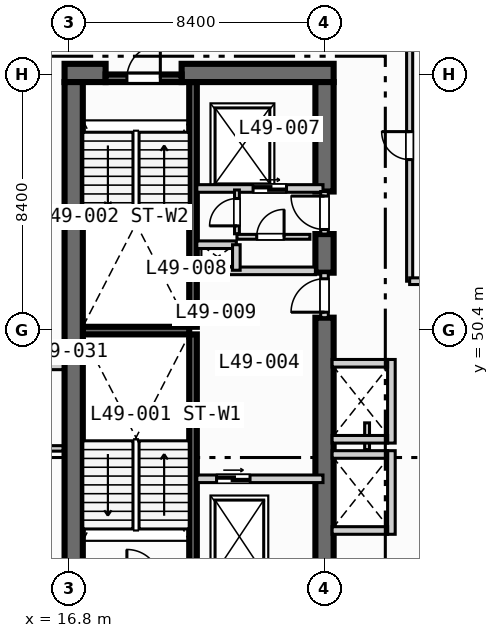
"""IFC4 building model, lengths in metres.
Left out: names, types, materials, properties, quantities, classifications, styles, units other than length and angle.
Written with IfcOpenShell. Run it as: python <this file> out.ifc"""

import sys

from ifc_helpers import new_model, si_unit, direction, frame, frame_2d, origin, place, context, subcontext, project, spatial, rectangle, extrude, element, fill, save


model = new_model("IFC4")
c1 = context("Model", 3, precision=1e-05, world=origin(), true_north=direction((0.0, 1.0)))
c2 = subcontext(c1, "Body", "Model", "MODEL_VIEW")
j1 = project(units=[si_unit("LENGTHUNIT", "METRE"), si_unit("PLANEANGLEUNIT", "RADIAN")], contexts=[c1])
p1 = place(None, origin())
s1 = spatial("IfcSite", under=j1, at=p1, CompositionType="ELEMENT")
p2 = place(p1, origin())
s2 = spatial("IfcBuilding", under=s1, at=p2, CompositionType="ELEMENT")
p3 = place(p2, frame((0.0, 0.0, 201.3)))
s3 = spatial("IfcBuildingStorey", under=s2, at=p3, CompositionType="ELEMENT", Elevation=201.3)
for number, where, z_axis, x_axis in (
    (1, (20.875, 42.2, 0.0), (0.0, 0.0, 1.0), (0.0, 1.0, 0.0)),
    (2, (20.875, 50.5, 0.0), (0.0, 0.0, 1.0), (0.0, 1.0, 0.0)),
):
    element("IfcWall", number, at=place(p3, frame(where, z_axis=z_axis, x_axis=x_axis)), inside=s3, PredefinedType="SOLIDWALL", context=c2, shape_type="SweptSolid", body=[
        extrude(rectangle(XDim=8.05, YDim=0.25, at=frame_2d((4.025, 0.0))), origin(), (0.0, 0.0, 1.0), 3.47),
    ])
p4 = place(p3, frame((17.25, 50.375, 0.0), z_axis=(0.0, 0.0, 1.0), x_axis=(1.0, 0.0, 0.0)))
e3 = element("IfcWall", 3, at=p4, inside=s3, PredefinedType="SOLIDWALL", context=c2, shape_type="SweptSolid", body=[
    extrude(rectangle(XDim=3.5, YDim=0.25, at=frame_2d((1.75, 0.0))), origin(), (0.0, 0.0, 1.0), 3.47),
])
p5 = place(p3, frame((16.65, 58.85, 0.0), z_axis=(0.0, 0.0, 1.0), x_axis=(1.0, 0.0, 0.0)))
e4 = element("IfcWall", 4, at=p5, inside=s3, PredefinedType="SHEAR", context=c2, shape_type="SweptSolid", body=[
    extrude(rectangle(XDim=1.35, YDim=0.6, at=frame_2d((0.675, 0.0))), origin(), (0.0, 0.0, 1.0), 3.47),
])
p6 = place(p3, frame((20.5, 58.85, 0.0), z_axis=(0.0, 0.0, 1.0), x_axis=(1.0, 0.0, 0.0)))
e5 = element("IfcWall", 5, at=p6, inside=s3, PredefinedType="SHEAR", context=c2, shape_type="SweptSolid", body=[
    extrude(rectangle(XDim=5.0, YDim=0.6, at=frame_2d((2.5, 0.0))), origin(), (0.0, 0.0, 1.0), 3.47),
])
p7 = place(p3, frame((16.95, 42.2, 0.0), z_axis=(0.0, 0.0, 1.0), x_axis=(0.0, 1.0, 0.0)))
e6 = element("IfcWall", 6, at=p7, inside=s3, PredefinedType="SHEAR", context=c2, shape_type="SweptSolid", body=[
    extrude(rectangle(XDim=16.35, YDim=0.6, at=frame_2d((8.175, 0.0))), origin(), (0.0, 0.0, 1.0), 3.47),
])
p8 = place(p3, frame((25.2, 42.2, 0.0), z_axis=(0.0, 0.0, 1.0), x_axis=(0.0, 1.0, 0.0)))
e7 = element("IfcWall", 7, at=p8, inside=s3, PredefinedType="SHEAR", context=c2, shape_type="SweptSolid", body=[
    extrude(rectangle(XDim=8.6, YDim=0.6, at=frame_2d((4.3, 0.0))), origin(), (0.0, 0.0, 1.0), 3.47),
])
p9 = place(p3, frame((25.2, 52.28, 0.0), z_axis=(0.0, 0.0, 1.0), x_axis=(0.0, 1.0, 0.0)))
e8 = element("IfcWall", 8, at=p9, inside=s3, PredefinedType="SHEAR", context=c2, shape_type="SweptSolid", body=[
    extrude(rectangle(XDim=1.27, YDim=0.6, at=frame_2d((0.635, 0.0))), origin(), (0.0, 0.0, 1.0), 3.47),
])
p10 = place(p3, frame((25.2, 54.95, 0.0), z_axis=(0.0, 0.0, 1.0), x_axis=(0.0, 1.0, 0.0)))
e9 = element("IfcWall", 9, at=p10, inside=s3, PredefinedType="SHEAR", context=c2, shape_type="SweptSolid", body=[
    extrude(rectangle(XDim=3.6, YDim=0.6, at=frame_2d((1.8, 0.0))), origin(), (0.0, 0.0, 1.0), 3.47),
])
p11 = place(p3, frame((18.0, 58.675, 0.0), z_axis=(0.0, 0.0, 1.0), x_axis=(1.0, 0.0, 0.0)))
e10 = element("IfcWall", 10, at=p11, inside=s3, PredefinedType="SOLIDWALL", context=c2, shape_type="SweptSolid", body=[
    extrude(rectangle(XDim=2.5, YDim=0.25, at=frame_2d((1.25, 0.0))), origin(), (0.0, 0.0, 1.0), 3.47),
])
p12 = place(p11, frame((0.7, 0.0, 0.0)))
e11 = element("IfcOpeningElement", 11, at=p12, cuts=e10, PredefinedType="OPENING", context=c2, shape_type="SweptSolid", body=[
    extrude(rectangle(XDim=1.1, YDim=2.15, at=frame_2d((0.55, 1.075))), frame((0.0, 0.135, 0.0), z_axis=(0.0, -1.0, 0.0), x_axis=(1.0, 0.0, 0.0)), (0.0, 0.0, 1.0), 0.27),
])
p13 = place(p3, frame((21.0, 45.5, 0.0), z_axis=(0.0, 0.0, 1.0), x_axis=(1.0, 0.0, 0.0)))
e12 = element("IfcWall", 12, at=p13, inside=s3, PredefinedType="SOLIDWALL", context=c2, shape_type="SweptSolid", body=[
    extrude(rectangle(XDim=4.15, YDim=0.25, at=frame_2d((2.075, 0.0))), origin(), (0.0, 0.0, 1.0), 3.47),
])
p14 = place(p13, frame((0.65, 0.0, 0.0)))
e13 = element("IfcOpeningElement", 13, at=p14, cuts=e12, PredefinedType="OPENING", context=c2, shape_type="SweptSolid", body=[
    extrude(rectangle(XDim=1.1, YDim=2.15, at=frame_2d((0.55, 1.075))), frame((0.0, 0.135, 0.0), z_axis=(0.0, -1.0, 0.0), x_axis=(1.0, 0.0, 0.0)), (0.0, 0.0, 1.0), 0.27),
])
p15 = place(p3, frame((25.2, 50.8, 0.0), z_axis=(0.0, 0.0, 1.0), x_axis=(0.0, 1.0, 0.0)))
e14 = element("IfcWall", 14, at=p15, inside=s3, PredefinedType="SOLIDWALL", context=c2, shape_type="SweptSolid", body=[
    extrude(rectangle(XDim=1.48, YDim=0.25, at=frame_2d((0.74, 0.0))), origin(), (0.0, 0.0, 1.0), 3.47),
])
p16 = place(p15, frame((0.18, 0.0, 0.0)))
e15 = element("IfcOpeningElement", 15, at=p16, cuts=e14, PredefinedType="OPENING", context=c2, shape_type="SweptSolid", body=[
    extrude(rectangle(XDim=1.1, YDim=2.15, at=frame_2d((0.55, 1.075))), frame((0.0, 0.135, 0.0), z_axis=(0.0, -1.0, 0.0), x_axis=(1.0, 0.0, 0.0)), (0.0, 0.0, 1.0), 0.27),
])
p17 = place(p3, frame((21.0, 52.34, 0.0), z_axis=(0.0, 0.0, 1.0), x_axis=(1.0, 0.0, 0.0)))
e16 = element("IfcWall", 16, at=p17, inside=s3, PredefinedType="SOLIDWALL", context=c2, shape_type="SweptSolid", body=[
    extrude(rectangle(XDim=3.9, YDim=0.25, at=frame_2d((1.95, 0.0))), origin(), (0.0, 0.0, 1.0), 3.47),
])
p18 = place(p3, frame((21.0, 55.05, 0.0), z_axis=(0.0, 0.0, 1.0), x_axis=(1.0, 0.0, 0.0)))
e17 = element("IfcWall", 17, at=p18, inside=s3, PredefinedType="SOLIDWALL", context=c2, shape_type="SweptSolid", body=[
    extrude(rectangle(XDim=4.15, YDim=0.25, at=frame_2d((2.075, 0.0))), origin(), (0.0, 0.0, 1.0), 3.47),
])
p19 = place(p18, frame((1.85, 0.0, 0.0)))
e18 = element("IfcOpeningElement", 18, at=p19, cuts=e17, PredefinedType="OPENING", context=c2, shape_type="SweptSolid", body=[
    extrude(rectangle(XDim=1.1, YDim=2.15, at=frame_2d((0.55, 1.075))), frame((0.0, 0.135, 0.0), z_axis=(0.0, -1.0, 0.0), x_axis=(1.0, 0.0, 0.0)), (0.0, 0.0, 1.0), 0.27),
])
p20 = place(p3, frame((25.2, 53.55, 0.0), z_axis=(0.0, 0.0, 1.0), x_axis=(0.0, 1.0, 0.0)))
e19 = element("IfcWall", 19, at=p20, inside=s3, PredefinedType="SOLIDWALL", context=c2, shape_type="SweptSolid", body=[
    extrude(rectangle(XDim=1.4, YDim=0.25, at=frame_2d((0.7, 0.0))), origin(), (0.0, 0.0, 1.0), 3.47),
])
p21 = place(p20, frame((0.15, 0.0, 0.0)))
e20 = element("IfcOpeningElement", 20, at=p21, cuts=e19, PredefinedType="OPENING", context=c2, shape_type="SweptSolid", body=[
    extrude(rectangle(XDim=1.1, YDim=2.15, at=frame_2d((0.55, 1.075))), frame((0.0, 0.135, 0.0), z_axis=(0.0, -1.0, 0.0), x_axis=(1.0, 0.0, 0.0)), (0.0, 0.0, 1.0), 0.27),
])
p22 = place(p3, frame((21.0, 53.2, 0.0), z_axis=(0.0, 0.0, 1.0), x_axis=(1.0, 0.0, 0.0)))
e21 = element("IfcWall", 21, at=p22, inside=s3, PredefinedType="SOLIDWALL", context=c2, shape_type="SweptSolid", body=[
    extrude(rectangle(XDim=1.3, YDim=0.25, at=frame_2d((0.65, 0.0))), origin(), (0.0, 0.0, 1.0), 3.47),
])
p23 = place(p3, frame((22.3, 52.36, 0.0), z_axis=(0.0, 0.0, 1.0), x_axis=(0.0, 1.0, 0.0)))
e22 = element("IfcWall", 22, at=p23, inside=s3, PredefinedType="SOLIDWALL", context=c2, shape_type="SweptSolid", body=[
    extrude(rectangle(XDim=0.84, YDim=0.25, at=frame_2d((0.42, 0.0))), origin(), (0.0, 0.0, 1.0), 3.47),
])
p24 = place(p3, frame((22.32, 53.56, 0.0), z_axis=(0.0, 0.0, 1.0), x_axis=(0.0, 1.0, 0.0)))
e23 = element("IfcWall", 23, at=p24, inside=s3, PredefinedType="PARTITIONING", context=c2, shape_type="SweptSolid", body=[
    extrude(rectangle(XDim=1.44, YDim=0.16, at=frame_2d((0.72, 0.0))), origin(), (0.0, 0.0, 1.0), 3.47),
])
p25 = place(p24, frame((0.26, 0.0, 0.0)))
e24 = element("IfcOpeningElement", 24, at=p25, cuts=e23, PredefinedType="OPENING", context=c2, shape_type="SweptSolid", body=[
    extrude(rectangle(XDim=0.9, YDim=2.1, at=frame_2d((0.45, 1.05))), frame((0.0, 0.09, 0.0), z_axis=(0.0, -1.0, 0.0), x_axis=(1.0, 0.0, 0.0)), (0.0, 0.0, 1.0), 0.18),
])
p26 = place(p3, frame((22.32, 53.46, 0.0), z_axis=(0.0, 0.0, 1.0), x_axis=(1.0, 0.0, 0.0)))
e25 = element("IfcWall", 25, at=p26, inside=s3, PredefinedType="PARTITIONING", context=c2, shape_type="SweptSolid", body=[
    extrude(rectangle(XDim=2.4, YDim=0.16, at=frame_2d((1.2, 0.0))), origin(), (0.0, 0.0, 1.0), 3.47),
])
p27 = place(p26, frame((0.65, 0.0, 0.0)))
e26 = element("IfcOpeningElement", 26, at=p27, cuts=e25, PredefinedType="OPENING", context=c2, shape_type="SweptSolid", body=[
    extrude(rectangle(XDim=0.9, YDim=2.1, at=frame_2d((0.45, 1.05))), frame((0.0, 0.09, 0.0), z_axis=(0.0, -1.0, 0.0), x_axis=(1.0, 0.0, 0.0)), (0.0, 0.0, 1.0), 0.18),
])
p28 = place(p3, frame((27.4, 43.675, 0.0), z_axis=(0.0, 0.0, 1.0), x_axis=(0.0, 1.0, 0.0)))
e27 = element("IfcWall", 27, at=p28, inside=s3, PredefinedType="SOLIDWALL", context=c2, shape_type="SweptSolid", body=[
    extrude(rectangle(XDim=2.75, YDim=0.25, at=frame_2d((1.375, 0.0))), origin(), (0.0, 0.0, 1.0), 3.47),
])
for number, where, z_axis, x_axis in (
    (28, (25.45, 43.8, 0.0), (0.0, 0.0, 1.0), (1.0, 0.0, 0.0)),
    (29, (25.45, 46.3, 0.0), (0.0, 0.0, 1.0), (1.0, 0.0, 0.0)),
):
    element("IfcWall", number, at=place(p3, frame(where, z_axis=z_axis, x_axis=x_axis)), inside=s3, PredefinedType="SOLIDWALL", context=c2, shape_type="SweptSolid", body=[
        extrude(rectangle(XDim=1.825, YDim=0.25, at=frame_2d((0.913, 0.0))), origin(), (0.0, 0.0, 1.0), 3.47),
    ])
p29 = place(p3, frame((26.6, 46.46, 0.0), z_axis=(0.0, 0.0, 1.0), x_axis=(0.0, 1.0, 0.0)))
e30 = element("IfcWall", 30, at=p29, inside=s3, PredefinedType="PARTITIONING", context=c2, shape_type="SweptSolid", body=[
    extrude(rectangle(XDim=0.88, YDim=0.16, at=frame_2d((0.44, 0.0))), origin(), (0.0, 0.0, 1.0), 3.47),
])
p30 = place(p3, frame((27.4, 46.675, 0.0), z_axis=(0.0, 0.0, 1.0), x_axis=(0.0, 1.0, 0.0)))
e31 = element("IfcWall", 31, at=p30, inside=s3, PredefinedType="SOLIDWALL", context=c2, shape_type="SweptSolid", body=[
    extrude(rectangle(XDim=2.75, YDim=0.25, at=frame_2d((1.375, 0.0))), origin(), (0.0, 0.0, 1.0), 3.47),
])
for number, where, z_axis, x_axis in (
    (32, (25.45, 46.8, 0.0), (0.0, 0.0, 1.0), (1.0, 0.0, 0.0)),
    (33, (25.45, 49.3, 0.0), (0.0, 0.0, 1.0), (1.0, 0.0, 0.0)),
):
    element("IfcWall", number, at=place(p3, frame(where, z_axis=z_axis, x_axis=x_axis)), inside=s3, PredefinedType="SOLIDWALL", context=c2, shape_type="SweptSolid", body=[
        extrude(rectangle(XDim=1.825, YDim=0.25, at=frame_2d((0.913, 0.0))), origin(), (0.0, 0.0, 1.0), 3.47),
    ])
p31 = place(p3, frame((0.35, 49.2, 0.0), z_axis=(0.0, 0.0, 1.0), x_axis=(1.0, 0.0, 0.0)))
e34 = element("IfcWall", 34, at=p31, inside=s3, PredefinedType="PARTITIONING", context=c2, shape_type="SweptSolid", body=[
    extrude(rectangle(XDim=16.25, YDim=0.22, at=frame_2d((8.125, 0.0))), origin(), (0.0, 0.0, 1.0), 3.47),
])
p32 = place(p3, frame((11.6, 46.5, 0.0), z_axis=(0.0, 0.0, 1.0), x_axis=(1.0, 0.0, 0.0)))
e35 = element("IfcWall", 35, at=p32, inside=s3, PredefinedType="PLUMBINGWALL", context=c2, shape_type="SweptSolid", body=[
    extrude(rectangle(XDim=5.0, YDim=0.18, at=frame_2d((2.5, 0.0))), origin(), (0.0, 0.0, 1.0), 3.47),
])
p33 = place(p32, frame((0.7, 0.0, 0.0)))
e36 = element("IfcOpeningElement", 36, at=p33, cuts=e35, PredefinedType="OPENING", context=c2, shape_type="SweptSolid", body=[
    extrude(rectangle(XDim=0.9, YDim=2.1, at=frame_2d((0.45, 1.05))), frame((0.0, 0.1, 0.0), z_axis=(0.0, -1.0, 0.0), x_axis=(1.0, 0.0, 0.0)), (0.0, 0.0, 1.0), 0.2),
])
p34 = place(p32, frame((3.15, 0.0, 0.0)))
e37 = element("IfcOpeningElement", 37, at=p34, cuts=e35, PredefinedType="OPENING", context=c2, shape_type="SweptSolid", body=[
    extrude(rectangle(XDim=0.92, YDim=2.1, at=frame_2d((0.46, 1.05))), frame((0.0, 0.1, 0.0), z_axis=(0.0, -1.0, 0.0), x_axis=(1.0, 0.0, 0.0)), (0.0, 0.0, 1.0), 0.2),
])
p35 = place(p3, frame((28.0, 52.0, 0.0), z_axis=(0.0, 0.0, 1.0), x_axis=(0.0, 1.0, 0.0)))
e38 = element("IfcWall", 38, at=p35, inside=s3, PredefinedType="PARTITIONING", context=c2, shape_type="SweptSolid", body=[
    extrude(rectangle(XDim=20.2, YDim=0.2, at=frame_2d((10.1, 0.0))), origin(), (0.0, 0.0, 1.0), 3.47),
])
p36 = place(p35, frame((4.0, 0.0, 0.0)))
e39 = element("IfcOpeningElement", 39, at=p36, cuts=e38, PredefinedType="OPENING", context=c2, shape_type="SweptSolid", body=[
    extrude(rectangle(XDim=0.92, YDim=2.1, at=frame_2d((0.46, 1.05))), frame((0.0, 0.11, 0.0), z_axis=(0.0, -1.0, 0.0), x_axis=(1.0, 0.0, 0.0)), (0.0, 0.0, 1.0), 0.22),
])
p37 = place(p3, frame((28.0, 52.0, 0.0), z_axis=(0.0, 0.0, 1.0), x_axis=(1.0, 0.0, 0.0)))
e40 = element("IfcWall", 40, at=p37, inside=s3, PredefinedType="PARTITIONING", context=c2, shape_type="SweptSolid", body=[
    extrude(rectangle(XDim=5.3, YDim=0.22, at=frame_2d((2.65, 0.0))), origin(), (0.0, 0.0, 1.0), 3.47),
])
p38 = place(p12, origin())
e41 = element("IfcDoor", 41, at=p38, inside=s3, OperationType="SINGLE_SWING_RIGHT", PredefinedType="DOOR", context=c2, shape_type="SweptSolid", body=[
    extrude(rectangle(XDim=1.1, YDim=2.15, at=frame_2d((0.55, 1.075))), frame((0.0, 0.025, 0.0), z_axis=(0.0, -1.0, 0.0), x_axis=(1.0, 0.0, 0.0)), (0.0, 0.0, 1.0), 0.05),
])
fill(e11, e41)
p39 = place(p14, origin())
e42 = element("IfcDoor", 42, at=p39, inside=s3, OperationType="SLIDING_TO_LEFT", PredefinedType="DOOR", context=c2, shape_type="SweptSolid", body=[
    extrude(rectangle(XDim=1.1, YDim=2.15, at=frame_2d((0.55, 1.075))), frame((0.0, 0.025, 0.0), z_axis=(0.0, -1.0, 0.0), x_axis=(1.0, 0.0, 0.0)), (0.0, 0.0, 1.0), 0.05),
])
fill(e13, e42)
p40 = place(p16, origin())
e43 = element("IfcDoor", 43, at=p40, inside=s3, OperationType="SINGLE_SWING_LEFT", PredefinedType="DOOR", context=c2, shape_type="SweptSolid", body=[
    extrude(rectangle(XDim=1.1, YDim=2.15, at=frame_2d((0.55, 1.075))), frame((0.0, 0.025, 0.0), z_axis=(0.0, -1.0, 0.0), x_axis=(1.0, 0.0, 0.0)), (0.0, 0.0, 1.0), 0.05),
])
fill(e15, e43)
p41 = place(p19, origin())
e44 = element("IfcDoor", 44, at=p41, inside=s3, OperationType="SLIDING_TO_LEFT", PredefinedType="DOOR", context=c2, shape_type="SweptSolid", body=[
    extrude(rectangle(XDim=1.1, YDim=2.15, at=frame_2d((0.55, 1.075))), frame((0.0, 0.025, 0.0), z_axis=(0.0, -1.0, 0.0), x_axis=(1.0, 0.0, 0.0)), (0.0, 0.0, 1.0), 0.05),
])
fill(e18, e44)
p42 = place(p21, origin())
e45 = element("IfcDoor", 45, at=p42, inside=s3, OperationType="SINGLE_SWING_RIGHT", PredefinedType="DOOR", context=c2, shape_type="SweptSolid", body=[
    extrude(rectangle(XDim=1.1, YDim=2.15, at=frame_2d((0.55, 1.075))), frame((0.0, 0.025, 0.0), z_axis=(0.0, -1.0, 0.0), x_axis=(1.0, 0.0, 0.0)), (0.0, 0.0, 1.0), 0.05),
])
fill(e20, e45)
p43 = place(p25, origin())
e46 = element("IfcDoor", 46, at=p43, inside=s3, OperationType="SINGLE_SWING_LEFT", PredefinedType="DOOR", context=c2, shape_type="SweptSolid", body=[
    extrude(rectangle(XDim=0.9, YDim=2.1, at=frame_2d((0.45, 1.05))), frame((0.0, 0.025, 0.0), z_axis=(0.0, -1.0, 0.0), x_axis=(1.0, 0.0, 0.0)), (0.0, 0.0, 1.0), 0.05),
])
fill(e24, e46)
p44 = place(p27, origin())
e47 = element("IfcDoor", 47, at=p44, inside=s3, OperationType="SINGLE_SWING_RIGHT", PredefinedType="DOOR", context=c2, shape_type="SweptSolid", body=[
    extrude(rectangle(XDim=0.9, YDim=2.1, at=frame_2d((0.45, 1.05))), frame((0.0, 0.025, 0.0), z_axis=(0.0, -1.0, 0.0), x_axis=(1.0, 0.0, 0.0)), (0.0, 0.0, 1.0), 0.05),
])
fill(e26, e47)
p45 = place(p36, origin())
e48 = element("IfcDoor", 48, at=p45, inside=s3, OperationType="SINGLE_SWING_RIGHT", PredefinedType="DOOR", context=c2, shape_type="SweptSolid", body=[
    extrude(rectangle(XDim=0.92, YDim=2.1, at=frame_2d((0.46, 1.05))), frame((0.0, 0.025, 0.0), z_axis=(0.0, -1.0, 0.0), x_axis=(1.0, 0.0, 0.0)), (0.0, 0.0, 1.0), 0.05),
])
fill(e39, e48)
save(model, sys.argv[1])
